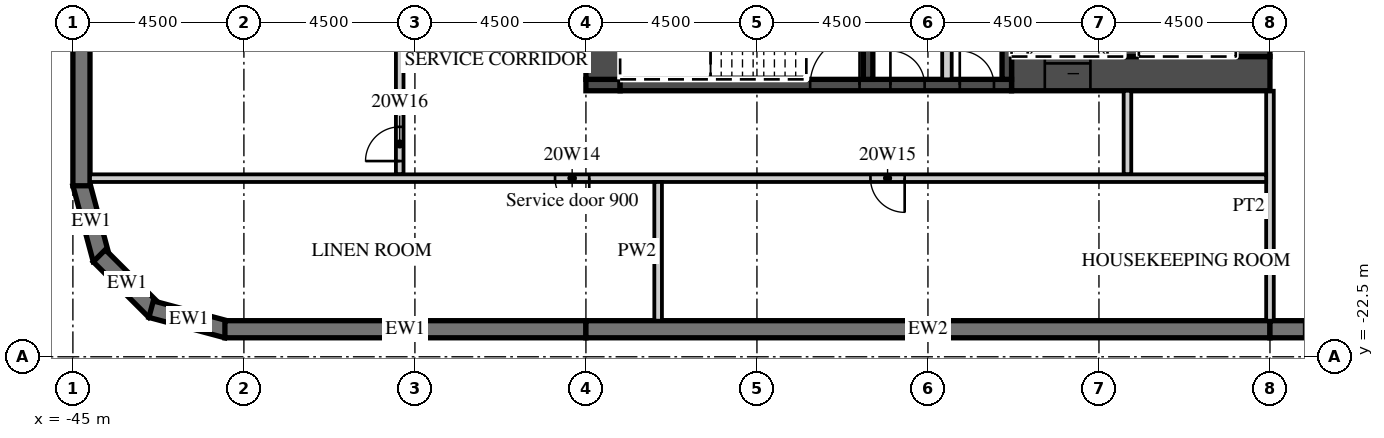
"""IFC4 building model, lengths in metres.
Left out: names, types, materials, properties, quantities, classifications, styles, units other than length and angle.
Written with IfcOpenShell. Run it as: python <this file> out.ifc"""

import sys

from ifc_helpers import new_model, si_unit, direction, frame, frame_2d, origin, place, context, subcontext, project, spatial, polyline, rectangle, outline, extrude, element, fill, save


model = new_model("IFC4")
c1 = context("Model", 3, precision=1e-05, world=origin(), true_north=direction((0.0, 1.0)))
c2 = subcontext(c1, "Body", "Model", "MODEL_VIEW")
j1 = project(units=[si_unit("LENGTHUNIT", "METRE"), si_unit("PLANEANGLEUNIT", "RADIAN")], contexts=[c1])
p1 = place(None, origin())
s1 = spatial("IfcSite", under=j1, at=p1, CompositionType="ELEMENT")
p2 = place(p1, origin())
s2 = spatial("IfcBuilding", under=s1, at=p2, CompositionType="ELEMENT")
p3 = place(p2, frame((0.0, 0.0, 96.3)))
s3 = spatial("IfcBuildingStorey", under=s2, at=p3, CompositionType="ELEMENT", Elevation=96.3)
p4 = place(p3, frame((-44.783, -17.942, 0.0), z_axis=(0.0, 0.0, 1.0), x_axis=(0.25881466832, -0.965926999034, 0.0)))
e1 = element("IfcWall", 1, at=p4, inside=s3, PredefinedType="SOLIDWALL", context=c2, shape_type="SweptSolid", body=[
    extrude(outline(polyline([(0.0, -0.225), (2.071, -0.225), (1.95, 0.225), (0.121, 0.225), (0.0, -0.225)])), origin(), (0.0, 0.0, 1.0), 3.0),
])
p5 = place(p3, frame((-44.305, -19.841, 0.0), z_axis=(0.0, 0.0, 1.0), x_axis=(0.707106781187, -0.707106781187, 0.0)))
e2 = element("IfcWall", 2, at=p5, inside=s3, PredefinedType="SOLIDWALL", context=c2, shape_type="SweptSolid", body=[
    extrude(outline(polyline([(0.0, -0.225), (2.071, -0.225), (1.95, 0.225), (0.121, 0.225), (0.0, -0.225)])), origin(), (0.0, 0.0, 1.0), 3.0),
])
p6 = place(p3, frame((-42.942, -21.247, 0.0), z_axis=(0.0, 0.0, 1.0), x_axis=(0.965926999034, -0.25881466832, 0.0)))
e3 = element("IfcWall", 3, at=p6, inside=s3, PredefinedType="SOLIDWALL", context=c2, shape_type="SweptSolid", body=[
    extrude(outline(polyline([(-0.0, -0.225), (2.07, -0.225), (1.95, 0.225), (0.12, 0.225), (-0.0, -0.225)])), origin(), (0.0, 0.0, 1.0), 3.0),
])
p7 = place(p3, frame((-41.0, -21.775, 0.0), z_axis=(0.0, 0.0, 1.0), x_axis=(1.0, 0.0, 0.0)))
e4 = element("IfcWall", 4, at=p7, inside=s3, PredefinedType="SOLIDWALL", context=c2, shape_type="SweptSolid", body=[
    extrude(rectangle(XDim=9.5, YDim=0.45, at=frame_2d((4.75, 0.0))), origin(), (0.0, 0.0, 1.0), 3.0),
])
p8 = place(p3, frame((-31.5, -21.775, 0.0), z_axis=(0.0, 0.0, 1.0), x_axis=(1.0, 0.0, 0.0)))
e5 = element("IfcWall", 5, at=p8, inside=s3, PredefinedType="SOLIDWALL", context=c2, shape_type="SweptSolid", body=[
    extrude(rectangle(XDim=18.0, YDim=0.45, at=frame_2d((9.0, 0.0))), origin(), (0.0, 0.0, 1.0), 3.0),
])
p9 = place(p3, frame((-13.5, -21.775, 0.0), z_axis=(0.0, 0.0, 1.0), x_axis=(1.0, 0.0, 0.0)))
e6 = element("IfcWall", 6, at=p9, inside=s3, PredefinedType="SOLIDWALL", context=c2, shape_type="SweptSolid", body=[
    extrude(rectangle(XDim=54.5, YDim=0.45, at=frame_2d((27.25, 0.0))), origin(), (0.0, 0.0, 1.0), 3.0),
])
p10 = place(p9, frame((0.9, 0.0, 0.45)))
e7 = element("IfcOpeningElement", 7, at=p10, cuts=e6, PredefinedType="OPENING", context=c2, shape_type="SweptSolid", body=[
    extrude(rectangle(XDim=2.7, YDim=2.25, at=frame_2d((1.35, 1.125))), frame((0.0, 0.235, 0.0), z_axis=(0.0, -1.0, 0.0), x_axis=(1.0, 0.0, 0.0)), (0.0, 0.0, 1.0), 0.47),
])
p11 = place(p9, frame((5.4, 0.0, 0.45)))
e8 = element("IfcOpeningElement", 8, at=p11, cuts=e6, PredefinedType="OPENING", context=c2, shape_type="SweptSolid", body=[
    extrude(rectangle(XDim=2.7, YDim=2.25, at=frame_2d((1.35, 1.125))), frame((0.0, 0.235, 0.0), z_axis=(0.0, -1.0, 0.0), x_axis=(1.0, 0.0, 0.0)), (0.0, 0.0, 1.0), 0.47),
])
p12 = place(p9, frame((9.9, 0.0, 0.45)))
e9 = element("IfcOpeningElement", 9, at=p12, cuts=e6, PredefinedType="OPENING", context=c2, shape_type="SweptSolid", body=[
    extrude(rectangle(XDim=2.7, YDim=2.25, at=frame_2d((1.35, 1.125))), frame((0.0, 0.235, 0.0), z_axis=(0.0, -1.0, 0.0), x_axis=(1.0, 0.0, 0.0)), (0.0, 0.0, 1.0), 0.47),
])
p13 = place(p9, frame((14.4, 0.0, 0.45)))
e10 = element("IfcOpeningElement", 10, at=p13, cuts=e6, PredefinedType="OPENING", context=c2, shape_type="SweptSolid", body=[
    extrude(rectangle(XDim=2.7, YDim=2.25, at=frame_2d((1.35, 1.125))), frame((0.0, 0.235, 0.0), z_axis=(0.0, -1.0, 0.0), x_axis=(1.0, 0.0, 0.0)), (0.0, 0.0, 1.0), 0.47),
])
p14 = place(p9, frame((18.9, 0.0, 0.45)))
e11 = element("IfcOpeningElement", 11, at=p14, cuts=e6, PredefinedType="OPENING", context=c2, shape_type="SweptSolid", body=[
    extrude(rectangle(XDim=2.7, YDim=2.25, at=frame_2d((1.35, 1.125))), frame((0.0, 0.235, 0.0), z_axis=(0.0, -1.0, 0.0), x_axis=(1.0, 0.0, 0.0)), (0.0, 0.0, 1.0), 0.47),
])
p15 = place(p9, frame((23.4, 0.0, 0.45)))
e12 = element("IfcOpeningElement", 12, at=p15, cuts=e6, PredefinedType="OPENING", context=c2, shape_type="SweptSolid", body=[
    extrude(rectangle(XDim=2.7, YDim=2.25, at=frame_2d((1.35, 1.125))), frame((0.0, 0.235, 0.0), z_axis=(0.0, -1.0, 0.0), x_axis=(1.0, 0.0, 0.0)), (0.0, 0.0, 1.0), 0.47),
])
p16 = place(p9, frame((27.9, 0.0, 0.45)))
e13 = element("IfcOpeningElement", 13, at=p16, cuts=e6, PredefinedType="OPENING", context=c2, shape_type="SweptSolid", body=[
    extrude(rectangle(XDim=2.7, YDim=2.25, at=frame_2d((1.35, 1.125))), frame((0.0, 0.235, 0.0), z_axis=(0.0, -1.0, 0.0), x_axis=(1.0, 0.0, 0.0)), (0.0, 0.0, 1.0), 0.47),
])
p17 = place(p9, frame((32.4, 0.0, 0.45)))
e14 = element("IfcOpeningElement", 14, at=p17, cuts=e6, PredefinedType="OPENING", context=c2, shape_type="SweptSolid", body=[
    extrude(rectangle(XDim=2.7, YDim=2.25, at=frame_2d((1.35, 1.125))), frame((0.0, 0.235, 0.0), z_axis=(0.0, -1.0, 0.0), x_axis=(1.0, 0.0, 0.0)), (0.0, 0.0, 1.0), 0.47),
])
p18 = place(p9, frame((36.9, 0.0, 0.45)))
e15 = element("IfcOpeningElement", 15, at=p18, cuts=e6, PredefinedType="OPENING", context=c2, shape_type="SweptSolid", body=[
    extrude(rectangle(XDim=2.7, YDim=2.25, at=frame_2d((1.35, 1.125))), frame((0.0, 0.235, 0.0), z_axis=(0.0, -1.0, 0.0), x_axis=(1.0, 0.0, 0.0)), (0.0, 0.0, 1.0), 0.47),
])
p19 = place(p9, frame((41.4, 0.0, 0.45)))
e16 = element("IfcOpeningElement", 16, at=p19, cuts=e6, PredefinedType="OPENING", context=c2, shape_type="SweptSolid", body=[
    extrude(rectangle(XDim=2.7, YDim=2.25, at=frame_2d((1.35, 1.125))), frame((0.0, 0.235, 0.0), z_axis=(0.0, -1.0, 0.0), x_axis=(1.0, 0.0, 0.0)), (0.0, 0.0, 1.0), 0.47),
])
p20 = place(p9, frame((45.9, 0.0, 0.45)))
e17 = element("IfcOpeningElement", 17, at=p20, cuts=e6, PredefinedType="OPENING", context=c2, shape_type="SweptSolid", body=[
    extrude(rectangle(XDim=2.7, YDim=2.25, at=frame_2d((1.35, 1.125))), frame((0.0, 0.235, 0.0), z_axis=(0.0, -1.0, 0.0), x_axis=(1.0, 0.0, 0.0)), (0.0, 0.0, 1.0), 0.47),
])
p21 = place(p9, frame((50.4, 0.0, 0.45)))
e18 = element("IfcOpeningElement", 18, at=p21, cuts=e6, PredefinedType="OPENING", context=c2, shape_type="SweptSolid", body=[
    extrude(rectangle(XDim=2.7, YDim=2.25, at=frame_2d((1.35, 1.125))), frame((0.0, 0.235, 0.0), z_axis=(0.0, -1.0, 0.0), x_axis=(1.0, 0.0, 0.0)), (0.0, 0.0, 1.0), 0.47),
])
p22 = place(p3, frame((-44.775, 18.0, 0.0), z_axis=(0.0, 0.0, 1.0), x_axis=(0.0, -1.0, 0.0)))
e19 = element("IfcWall", 19, at=p22, inside=s3, PredefinedType="SOLIDWALL", context=c2, shape_type="SweptSolid", body=[
    extrude(rectangle(XDim=36.0, YDim=0.45, at=frame_2d((18.0, 0.0))), origin(), (0.0, 0.0, 1.0), 3.0),
])
p23 = place(p22, frame((3.9, 0.0, 0.45)))
e20 = element("IfcOpeningElement", 20, at=p23, cuts=e19, PredefinedType="OPENING", context=c2, shape_type="SweptSolid", body=[
    extrude(rectangle(XDim=3.3, YDim=2.25, at=frame_2d((1.65, 1.125))), frame((0.0, 0.235, 0.0), z_axis=(0.0, -1.0, 0.0), x_axis=(1.0, 0.0, 0.0)), (0.0, 0.0, 1.0), 0.47),
])
p24 = place(p22, frame((8.4, 0.0, 0.45)))
e21 = element("IfcOpeningElement", 21, at=p24, cuts=e19, PredefinedType="OPENING", context=c2, shape_type="SweptSolid", body=[
    extrude(rectangle(XDim=3.3, YDim=2.25, at=frame_2d((1.65, 1.125))), frame((0.0, 0.235, 0.0), z_axis=(0.0, -1.0, 0.0), x_axis=(1.0, 0.0, 0.0)), (0.0, 0.0, 1.0), 0.47),
])
p25 = place(p22, frame((12.9, 0.0, 0.45)))
e22 = element("IfcOpeningElement", 22, at=p25, cuts=e19, PredefinedType="OPENING", context=c2, shape_type="SweptSolid", body=[
    extrude(rectangle(XDim=3.3, YDim=2.25, at=frame_2d((1.65, 1.125))), frame((0.0, 0.235, 0.0), z_axis=(0.0, -1.0, 0.0), x_axis=(1.0, 0.0, 0.0)), (0.0, 0.0, 1.0), 0.47),
])
p26 = place(p3, frame((-13.5, -21.55, 0.0), z_axis=(0.0, 0.0, 1.0), x_axis=(0.0, 1.0, 0.0)))
e23 = element("IfcWall", 23, at=p26, inside=s3, PredefinedType="PARTITIONING", context=c2, shape_type="SweptSolid", body=[
    extrude(rectangle(XDim=6.05, YDim=0.2, at=frame_2d((3.025, 0.0))), origin(), (0.0, 0.0, 1.0), 3.0),
])
p27 = place(p3, frame((-20.3, -15.05, 0.0), z_axis=(0.0, 0.0, 1.0), x_axis=(1.0, 0.0, 0.0)))
e24 = element("IfcWall", 24, at=p27, inside=s3, PredefinedType="SHEAR", context=c2, shape_type="SweptSolid", body=[
    extrude(rectangle(XDim=6.8, YDim=0.9, at=frame_2d((3.4, 0.0))), origin(), (0.0, 0.0, 1.0), 3.0),
])
p28 = place(p27, frame((0.875, 0.0, 0.0)))
e25 = element("IfcOpeningElement", 25, at=p28, cuts=e24, PredefinedType="OPENING", context=c2, shape_type="SweptSolid", body=[
    extrude(rectangle(XDim=1.2, YDim=2.1, at=frame_2d((0.6, 1.05))), frame((0.0, 0.46, 0.0), z_axis=(0.0, -1.0, 0.0), x_axis=(1.0, 0.0, 0.0)), (0.0, 0.0, 1.0), 0.92),
])
p29 = place(p3, frame((-31.5, -15.35, 0.0), z_axis=(0.0, 0.0, 1.0), x_axis=(1.0, 0.0, 0.0)))
e26 = element("IfcWall", 26, at=p29, inside=s3, PredefinedType="SHEAR", context=c2, shape_type="SweptSolid", body=[
    extrude(rectangle(XDim=0.9, YDim=0.3, at=frame_2d((0.45, 0.0))), origin(), (0.0, 0.0, 1.0), 3.0),
])
p30 = place(p3, frame((-30.6, -15.35, 0.0), z_axis=(0.0, 0.0, 1.0), x_axis=(1.0, 0.0, 0.0)))
e27 = element("IfcWall", 27, at=p30, inside=s3, PredefinedType="SHEAR", context=c2, shape_type="SweptSolid", body=[
    extrude(rectangle(XDim=10.3, YDim=0.3, at=frame_2d((5.15, 0.0))), origin(), (0.0, 0.0, 1.0), 3.0),
])
p31 = place(p30, frame((5.0, 0.0, 0.0)))
e28 = element("IfcOpeningElement", 28, at=p31, cuts=e27, PredefinedType="OPENING", context=c2, shape_type="SweptSolid", body=[
    extrude(rectangle(XDim=1.3, YDim=2.1, at=frame_2d((0.65, 1.05))), frame((0.0, 0.16, 0.0), z_axis=(0.0, -1.0, 0.0), x_axis=(1.0, 0.0, 0.0)), (0.0, 0.0, 1.0), 0.32),
])
p32 = place(p30, frame((7.113, 0.0, 0.0)))
e29 = element("IfcOpeningElement", 29, at=p32, cuts=e27, PredefinedType="OPENING", context=c2, shape_type="SweptSolid", body=[
    extrude(rectangle(XDim=0.9, YDim=2.1, at=frame_2d((0.45, 1.05))), frame((0.0, 0.16, 0.0), z_axis=(0.0, -1.0, 0.0), x_axis=(1.0, 0.0, 0.0)), (0.0, 0.0, 1.0), 0.32),
])
p33 = place(p30, frame((8.938, 0.0, 0.0)))
e30 = element("IfcOpeningElement", 30, at=p33, cuts=e27, PredefinedType="OPENING", context=c2, shape_type="SweptSolid", body=[
    extrude(rectangle(XDim=0.9, YDim=2.1, at=frame_2d((0.45, 1.05))), frame((0.0, 0.16, 0.0), z_axis=(0.0, -1.0, 0.0), x_axis=(1.0, 0.0, 0.0)), (0.0, 0.0, 1.0), 0.32),
])
p34 = place(p3, frame((-31.05, -15.2, 0.0), z_axis=(0.0, 0.0, 1.0), x_axis=(0.0, 1.0, 0.0)))
e31 = element("IfcWall", 31, at=p34, inside=s3, PredefinedType="SHEAR", context=c2, shape_type="SweptSolid", body=[
    extrude(rectangle(XDim=12.8, YDim=0.9, at=frame_2d((6.4, 0.0))), origin(), (0.0, 0.0, 1.0), 3.0),
])
p35 = place(p34, frame((11.5, 0.0, 0.0)))
e32 = element("IfcOpeningElement", 32, at=p35, cuts=e31, PredefinedType="OPENING", context=c2, shape_type="SweptSolid", body=[
    extrude(rectangle(XDim=1.1, YDim=2.1, at=frame_2d((0.55, 1.05))), frame((0.0, 0.46, 0.0), z_axis=(0.0, -1.0, 0.0), x_axis=(1.0, 0.0, 0.0)), (0.0, 0.0, 1.0), 0.92),
])
p36 = place(p3, frame((-13.95, -14.6, 0.0), z_axis=(0.0, 0.0, 1.0), x_axis=(0.0, 1.0, 0.0)))
e33 = element("IfcWall", 33, at=p36, inside=s3, PredefinedType="SHEAR", context=c2, shape_type="SweptSolid", body=[
    extrude(rectangle(XDim=12.2, YDim=0.9, at=frame_2d((6.1, 0.0))), origin(), (0.0, 0.0, 1.0), 3.0),
])
p37 = place(p3, frame((-17.15, -14.6, 0.0), z_axis=(0.0, 0.0, 1.0), x_axis=(0.0, 1.0, 0.0)))
e34 = element("IfcWall", 34, at=p37, inside=s3, PredefinedType="SHEAR", context=c2, shape_type="SweptSolid", body=[
    extrude(rectangle(XDim=5.8, YDim=0.4, at=frame_2d((2.9, 0.0))), origin(), (0.0, 0.0, 1.0), 3.0),
])
for number, where, z_axis, x_axis in (
    (35, (-20.425, -15.2, 0.0), (0.0, 0.0, 1.0), (0.0, 1.0, 0.0)),
    (36, (-24.075, -15.2, 0.0), (0.0, 0.0, 1.0), (0.0, 1.0, 0.0)),
):
    element("IfcWall", number, at=place(p3, frame(where, z_axis=z_axis, x_axis=x_axis)), inside=s3, PredefinedType="SHEAR", context=c2, shape_type="SweptSolid", body=[
        extrude(rectangle(XDim=3.25, YDim=0.25, at=frame_2d((1.625, 0.0))), origin(), (0.0, 0.0, 1.0), 3.0),
    ])
p38 = place(p3, frame((-22.0, -15.2, 0.0), z_axis=(0.0, 0.0, 1.0), x_axis=(0.0, 1.0, 0.0)))
e37 = element("IfcWall", 37, at=p38, inside=s3, PredefinedType="PARTITIONING", context=c2, shape_type="SweptSolid", body=[
    extrude(rectangle(XDim=3.25, YDim=0.25, at=frame_2d((1.625, 0.0))), origin(), (0.0, 0.0, 1.0), 3.0),
])
p39 = place(p3, frame((-17.25, -17.7, 0.0), z_axis=(0.0, 0.0, 1.0), x_axis=(0.0, 1.0, 0.0)))
e38 = element("IfcWall", 38, at=p39, inside=s3, PredefinedType="PARTITIONING", context=c2, shape_type="SweptSolid", body=[
    extrude(rectangle(XDim=2.2, YDim=0.2, at=frame_2d((1.1, 0.0))), origin(), (0.0, 0.0, 1.0), 3.0),
])
p40 = place(p3, frame((-36.4, -17.7, 0.0), z_axis=(0.0, 0.0, 1.0), x_axis=(0.0, 1.0, 0.0)))
e39 = element("IfcWall", 39, at=p40, inside=s3, PredefinedType="PARTITIONING", context=c2, shape_type="SweptSolid", body=[
    extrude(rectangle(XDim=15.95, YDim=0.2, at=frame_2d((7.975, 0.0))), origin(), (0.0, 0.0, 1.0), 3.0),
])
p41 = place(p40, frame((0.35, 0.0, 0.0)))
e40 = element("IfcOpeningElement", 40, at=p41, cuts=e39, PredefinedType="OPENING", context=c2, shape_type="SweptSolid", body=[
    extrude(rectangle(XDim=0.9, YDim=2.1, at=frame_2d((0.45, 1.05))), frame((0.0, 0.11, 0.0), z_axis=(0.0, -1.0, 0.0), x_axis=(1.0, 0.0, 0.0)), (0.0, 0.0, 1.0), 0.22),
])
p42 = place(p3, frame((-44.55, -17.8, 0.0), z_axis=(0.0, 0.0, 1.0), x_axis=(1.0, 0.0, 0.0)))
e41 = element("IfcWall", 41, at=p42, inside=s3, PredefinedType="PARTITIONING", context=c2, shape_type="SweptSolid", body=[
    extrude(rectangle(XDim=30.95, YDim=0.2, at=frame_2d((15.475, 0.0))), origin(), (0.0, 0.0, 1.0), 3.0),
])
p43 = place(p42, frame((12.238, 0.0, 0.0)))
e42 = element("IfcOpeningElement", 42, at=p43, cuts=e41, PredefinedType="OPENING", context=c2, shape_type="SweptSolid", body=[
    extrude(rectangle(XDim=0.9, YDim=2.1, at=frame_2d((0.45, 1.05))), frame((0.0, 0.11, 0.0), z_axis=(0.0, -1.0, 0.0), x_axis=(1.0, 0.0, 0.0)), (0.0, 0.0, 1.0), 0.22),
])
p44 = place(p42, frame((20.538, 0.0, 0.0)))
e43 = element("IfcOpeningElement", 43, at=p44, cuts=e41, PredefinedType="OPENING", context=c2, shape_type="SweptSolid", body=[
    extrude(rectangle(XDim=0.9, YDim=2.1, at=frame_2d((0.45, 1.05))), frame((0.0, 0.11, 0.0), z_axis=(0.0, -1.0, 0.0), x_axis=(1.0, 0.0, 0.0)), (0.0, 0.0, 1.0), 0.22),
])
p45 = place(p3, frame((-29.6, -21.55, 0.0), z_axis=(0.0, 0.0, 1.0), x_axis=(0.0, 1.0, 0.0)))
e44 = element("IfcWall", 44, at=p45, inside=s3, PredefinedType="PARTITIONING", context=c2, shape_type="SweptSolid", body=[
    extrude(rectangle(XDim=3.65, YDim=0.2, at=frame_2d((1.825, 0.0))), origin(), (0.0, 0.0, 1.0), 3.0),
])
p46 = place(p28, origin())
e45 = element("IfcDoor", 45, at=p46, inside=s3, OperationType="SLIDING_TO_LEFT", PredefinedType="DOOR", context=c2, shape_type="SweptSolid", body=[
    extrude(rectangle(XDim=1.2, YDim=2.1, at=frame_2d((0.6, 1.05))), frame((0.0, 0.025, 0.0), z_axis=(0.0, -1.0, 0.0), x_axis=(1.0, 0.0, 0.0)), (0.0, 0.0, 1.0), 0.05),
])
fill(e25, e45)
p47 = place(p31, origin())
e46 = element("IfcDoor", 46, at=p47, inside=s3, OperationType="SINGLE_SWING_RIGHT", PredefinedType="DOOR", context=c2, shape_type="SweptSolid", body=[
    extrude(rectangle(XDim=1.3, YDim=2.1, at=frame_2d((0.65, 1.05))), frame((0.0, 0.025, 0.0), z_axis=(0.0, -1.0, 0.0), x_axis=(1.0, 0.0, 0.0)), (0.0, 0.0, 1.0), 0.05),
])
fill(e28, e46)
p48 = place(p32, origin())
e47 = element("IfcDoor", 47, at=p48, inside=s3, OperationType="SINGLE_SWING_LEFT", PredefinedType="DOOR", context=c2, shape_type="SweptSolid", body=[
    extrude(rectangle(XDim=0.9, YDim=2.1, at=frame_2d((0.45, 1.05))), frame((0.0, 0.025, 0.0), z_axis=(0.0, -1.0, 0.0), x_axis=(1.0, 0.0, 0.0)), (0.0, 0.0, 1.0), 0.05),
])
fill(e29, e47)
p49 = place(p33, origin())
e48 = element("IfcDoor", 48, at=p49, inside=s3, OperationType="SINGLE_SWING_LEFT", PredefinedType="DOOR", context=c2, shape_type="SweptSolid", body=[
    extrude(rectangle(XDim=0.9, YDim=2.1, at=frame_2d((0.45, 1.05))), frame((0.0, 0.025, 0.0), z_axis=(0.0, -1.0, 0.0), x_axis=(1.0, 0.0, 0.0)), (0.0, 0.0, 1.0), 0.05),
])
fill(e30, e48)
p50 = place(p43, origin())
e49 = element("IfcDoor", 49, at=p50, inside=s3, OperationType="SINGLE_SWING_RIGHT", PredefinedType="DOOR", context=c2, shape_type="SweptSolid", body=[
    extrude(rectangle(XDim=0.9, YDim=2.1, at=frame_2d((0.45, 1.05))), frame((0.0, 0.025, 0.0), z_axis=(0.0, -1.0, 0.0), x_axis=(1.0, 0.0, 0.0)), (0.0, 0.0, 1.0), 0.05),
])
fill(e42, e49)
p51 = place(p44, origin())
e50 = element("IfcDoor", 50, at=p51, inside=s3, OperationType="SINGLE_SWING_RIGHT", PredefinedType="DOOR", context=c2, shape_type="SweptSolid", body=[
    extrude(rectangle(XDim=0.9, YDim=2.1, at=frame_2d((0.45, 1.05))), frame((0.0, 0.025, 0.0), z_axis=(0.0, -1.0, 0.0), x_axis=(1.0, 0.0, 0.0)), (0.0, 0.0, 1.0), 0.05),
])
fill(e43, e50)
p52 = place(p41, origin())
e51 = element("IfcDoor", 51, at=p52, inside=s3, OperationType="SINGLE_SWING_LEFT", PredefinedType="DOOR", context=c2, shape_type="SweptSolid", body=[
    extrude(rectangle(XDim=0.9, YDim=2.1, at=frame_2d((0.45, 1.05))), frame((0.0, 0.025, 0.0), z_axis=(0.0, -1.0, 0.0), x_axis=(1.0, 0.0, 0.0)), (0.0, 0.0, 1.0), 0.05),
])
fill(e40, e51)
save(model, sys.argv[1])
